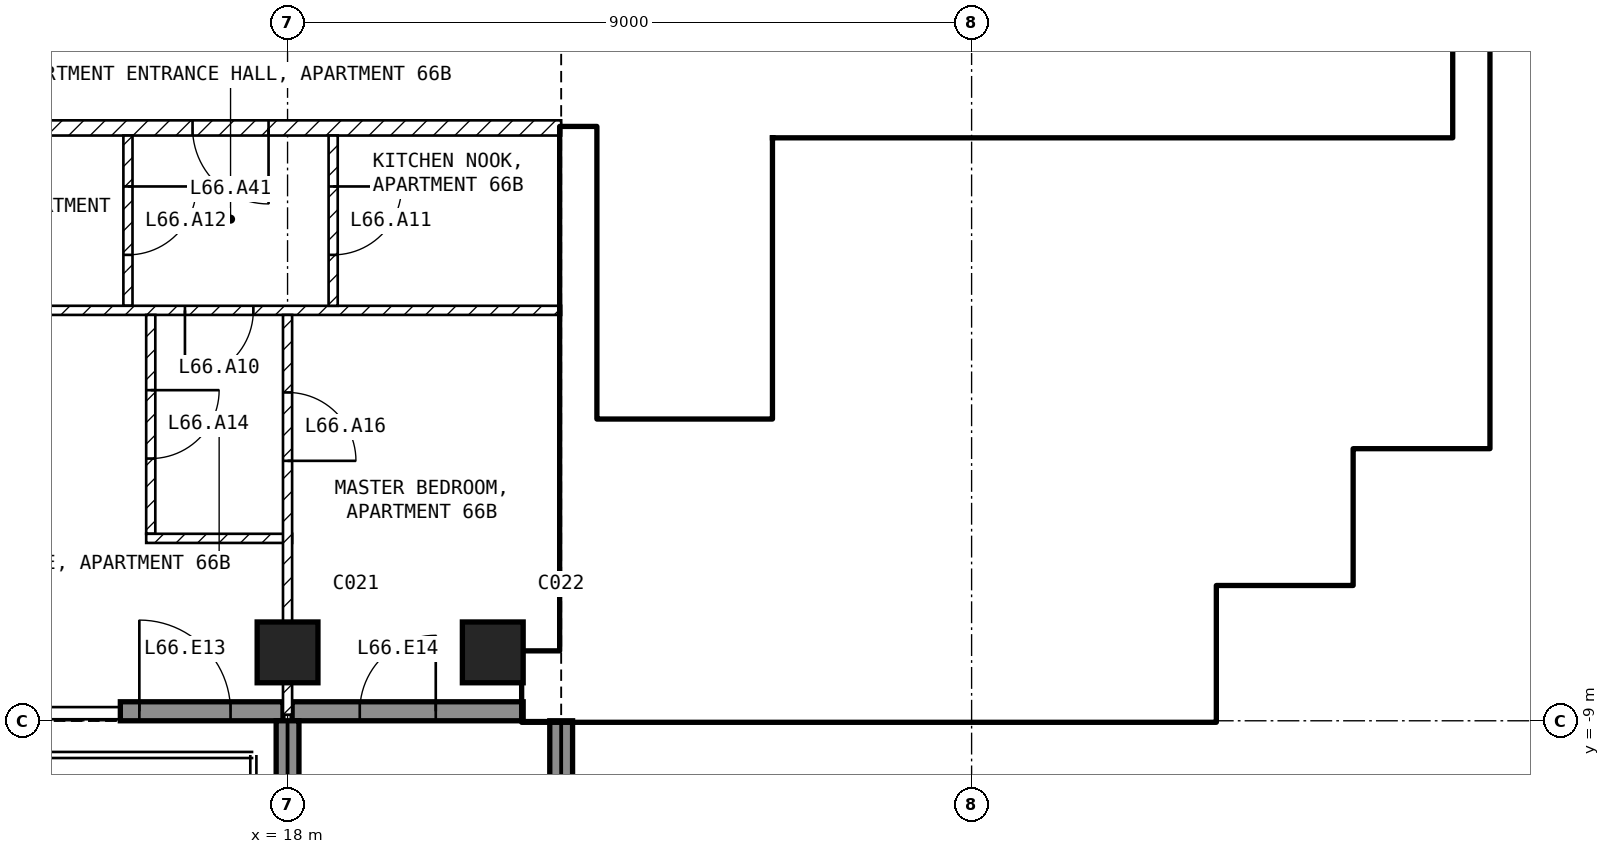
"""IFC4 building model, lengths in metres.
Left out: names, types, materials, properties, quantities, classifications, styles, units other than length and angle.
Written with IfcOpenShell. Run it as: python <this file> out.ifc"""

import sys

from ifc_helpers import new_model, si_unit, direction, frame, frame_2d, origin, origin_2d, place, context, subcontext, project, spatial, rectangle, extrude, element, fill, save


model = new_model("IFC4")
c1 = context("Model", 3, precision=1e-05, world=origin(), true_north=direction((0.0, 1.0)))
c2 = subcontext(c1, "Body", "Model", "MODEL_VIEW")
j1 = project(units=[si_unit("LENGTHUNIT", "METRE"), si_unit("PLANEANGLEUNIT", "RADIAN")], contexts=[c1])
p1 = place(None, origin())
s1 = spatial("IfcSite", under=j1, at=p1, CompositionType="ELEMENT")
p2 = place(p1, origin())
s2 = spatial("IfcBuilding", under=s1, at=p2, CompositionType="ELEMENT")
p3 = place(p2, frame((0.0, 0.0, 260.5)))
s3 = spatial("IfcBuildingStorey", under=s2, at=p3, CompositionType="ELEMENT", Elevation=260.5)
for number, where, z_axis, x_axis in (
    (1, (18.0, -8.1, -0.25), (0.0, 0.0, 1.0), (1.0, 0.0, 0.0)),
    (2, (20.7, -8.1, -0.25), (0.0, 0.0, 1.0), (1.0, 0.0, 0.0)),
):
    element("IfcColumn", number, at=place(p3, frame(where, z_axis=z_axis, x_axis=x_axis)), inside=s3, PredefinedType="COLUMN", context=c2, shape_type="SweptSolid", body=[
        extrude(rectangle(XDim=0.8, YDim=0.8, at=origin_2d()), origin(), (0.0, 0.0, 1.0), 3.5),
    ])
p4 = place(p3, frame((15.8, -8.875, 0.0), z_axis=(0.0, 0.0, 1.0), x_axis=(1.0, 0.0, 0.0)))
e3 = element("IfcWall", 3, at=p4, inside=s3, PredefinedType="SOLIDWALL", context=c2, shape_type="SweptSolid", body=[
    extrude(rectangle(XDim=2.14, YDim=0.25, at=frame_2d((1.07, 0.0))), origin(), (0.0, 0.0, 1.0), 3.25),
])
p5 = place(p4, frame((0.25, 0.0, 0.0)))
e4 = element("IfcOpeningElement", 4, at=p5, cuts=e3, PredefinedType="OPENING", context=c2, shape_type="SweptSolid", body=[
    extrude(rectangle(XDim=1.2, YDim=2.4, at=frame_2d((0.6, 1.2))), frame((0.0, 0.135, 0.0), z_axis=(0.0, -1.0, 0.0), x_axis=(1.0, 0.0, 0.0)), (0.0, 0.0, 1.0), 0.27),
])
p6 = place(p3, frame((18.06, -8.875, 0.0), z_axis=(0.0, 0.0, 1.0), x_axis=(1.0, 0.0, 0.0)))
e5 = element("IfcWall", 5, at=p6, inside=s3, PredefinedType="SOLIDWALL", context=c2, shape_type="SweptSolid", body=[
    extrude(rectangle(XDim=3.04, YDim=0.25, at=frame_2d((1.52, 0.0))), origin(), (0.0, 0.0, 1.0), 3.25),
])
p7 = place(p6, frame((0.89, 0.0, 0.0)))
e6 = element("IfcOpeningElement", 6, at=p7, cuts=e5, PredefinedType="OPENING", context=c2, shape_type="SweptSolid", body=[
    extrude(rectangle(XDim=1.0, YDim=2.4, at=frame_2d((0.5, 1.2))), frame((0.0, 0.135, 0.0), z_axis=(0.0, -1.0, 0.0), x_axis=(1.0, 0.0, 0.0)), (0.0, 0.0, 1.0), 0.27),
])
p8 = place(p3, frame((18.0, -9.0, 0.0), z_axis=(0.0, 0.0, 1.0), x_axis=(0.0, -1.0, 0.0)))
e7 = element("IfcWall", 7, at=p8, inside=s3, PredefinedType="SOLIDWALL", context=c2, shape_type="SweptSolid", body=[
    extrude(rectangle(XDim=2.74, YDim=0.3, at=frame_2d((1.37, 0.0))), origin(), (0.0, 0.0, 1.0), 3.25),
])
p9 = place(p3, frame((21.6, -9.0, 0.0), z_axis=(0.0, 0.0, 1.0), x_axis=(0.0, -1.0, 0.0)))
e8 = element("IfcWall", 8, at=p9, inside=s3, PredefinedType="SOLIDWALL", context=c2, shape_type="SweptSolid", body=[
    extrude(rectangle(XDim=2.7, YDim=0.3, at=frame_2d((1.35, 0.0))), origin(), (0.0, 0.0, 1.0), 3.25),
])
p10 = place(p3, frame((21.1, -8.55, 0.0), z_axis=(0.0, 0.0, 1.0), x_axis=(1.0, 0.0, 0.0)))
e9 = element("IfcWall", 9, at=p10, inside=s3, PredefinedType="SHEAR", context=c2, shape_type="SweptSolid", body=[
    extrude(rectangle(XDim=9.1, YDim=0.9, at=frame_2d((4.55, 0.0))), origin(), (0.0, 0.0, 1.0), 3.25),
])
p11 = place(p3, frame((29.975, -8.1, 0.0), z_axis=(0.0, 0.0, 1.0), x_axis=(0.0, 1.0, 0.0)))
e10 = element("IfcWall", 10, at=p11, inside=s3, PredefinedType="SHEAR", context=c2, shape_type="SweptSolid", body=[
    extrude(rectangle(XDim=1.35, YDim=0.45, at=frame_2d((0.675, 0.0))), origin(), (0.0, 0.0, 1.0), 3.25),
])
for number, where, z_axis, x_axis in (
    (11, (30.2, -6.975, 0.0), (0.0, 0.0, 1.0), (1.0, 0.0, 0.0)),
    (12, (31.775, -6.75, 0.0), (0.0, 0.0, 1.0), (0.0, 1.0, 0.0)),
    (13, (32.0, -5.175, 0.0), (0.0, 0.0, 1.0), (1.0, 0.0, 0.0)),
):
    element("IfcWall", number, at=place(p3, frame(where, z_axis=z_axis, x_axis=x_axis)), inside=s3, PredefinedType="SHEAR", context=c2, shape_type="SweptSolid", body=[
        extrude(rectangle(XDim=1.8, YDim=0.45, at=frame_2d((0.9, 0.0))), origin(), (0.0, 0.0, 1.0), 3.25),
    ])
p12 = place(p3, frame((33.575, -4.95, 0.0), z_axis=(0.0, 0.0, 1.0), x_axis=(0.0, 1.0, 0.0)))
e14 = element("IfcWall", 14, at=p12, inside=s3, PredefinedType="SHEAR", context=c2, shape_type="SweptSolid", body=[
    extrude(rectangle(XDim=10.35, YDim=0.45, at=frame_2d((5.175, 0.0))), origin(), (0.0, 0.0, 1.0), 3.25),
])
p13 = place(p3, frame((21.825, -8.1, 0.0), z_axis=(0.0, 0.0, 1.0), x_axis=(0.0, 1.0, 0.0)))
e15 = element("IfcWall", 15, at=p13, inside=s3, PredefinedType="SHEAR", context=c2, shape_type="SweptSolid", body=[
    extrude(rectangle(XDim=6.9, YDim=0.45, at=frame_2d((3.45, 0.0))), origin(), (0.0, 0.0, 1.0), 3.25),
])
p14 = place(p3, frame((24.5, -5.05, 0.0), z_axis=(0.0, 0.0, 1.0), x_axis=(0.0, 1.0, 0.0)))
e16 = element("IfcWall", 16, at=p14, inside=s3, PredefinedType="SOLIDWALL", context=c2, shape_type="SweptSolid", body=[
    extrude(rectangle(XDim=3.7, YDim=0.2, at=frame_2d((1.85, 0.0))), origin(), (0.0, 0.0, 1.0), 3.25),
])
p15 = place(p14, frame((0.1, 0.0, 0.0)))
e17 = element("IfcOpeningElement", 17, at=p15, cuts=e16, PredefinedType="OPENING", context=c2, shape_type="SweptSolid", body=[
    extrude(rectangle(XDim=0.8, YDim=2.1, at=frame_2d((0.4, 1.05))), frame((0.0, 0.11, 0.0), z_axis=(0.0, -1.0, 0.0), x_axis=(1.0, 0.0, 0.0)), (0.0, 0.0, 1.0), 0.22),
])
p16 = place(p3, frame((22.05, -5.15, 0.0), z_axis=(0.0, 0.0, 1.0), x_axis=(1.0, 0.0, 0.0)))
e18 = element("IfcWall", 18, at=p16, inside=s3, PredefinedType="SOLIDWALL", context=c2, shape_type="SweptSolid", body=[
    extrude(rectangle(XDim=6.3, YDim=0.2, at=frame_2d((3.15, 0.0))), origin(), (0.0, 0.0, 1.0), 3.25),
])
p17 = place(p16, frame((0.2, 0.0, 0.0)))
e19 = element("IfcOpeningElement", 19, at=p17, cuts=e18, PredefinedType="OPENING", context=c2, shape_type="SweptSolid", body=[
    extrude(rectangle(XDim=1.0, YDim=2.1, at=frame_2d((0.5, 1.05))), frame((0.0, 0.11, 0.0), z_axis=(0.0, -1.0, 0.0), x_axis=(1.0, 0.0, 0.0)), (0.0, 0.0, 1.0), 0.22),
])
p18 = place(p3, frame((28.25, -8.1, 0.0), z_axis=(0.0, 0.0, 1.0), x_axis=(0.0, 1.0, 0.0)))
e20 = element("IfcWall", 20, at=p18, inside=s3, PredefinedType="SOLIDWALL", context=c2, shape_type="SweptSolid", body=[
    extrude(rectangle(XDim=2.85, YDim=0.2, at=frame_2d((1.425, 0.0))), origin(), (0.0, 0.0, 1.0), 3.25),
])
p19 = place(p3, frame((24.6, -1.45, 0.0), z_axis=(0.0, 0.0, 1.0), x_axis=(1.0, 0.0, 0.0)))
e21 = element("IfcWall", 21, at=p19, inside=s3, PredefinedType="SOLIDWALL", context=c2, shape_type="SweptSolid", body=[
    extrude(rectangle(XDim=8.75, YDim=0.2, at=frame_2d((4.375, 0.0))), origin(), (0.0, 0.0, 1.0), 3.25),
])
p20 = place(p19, frame((0.4, 0.0, 0.0)))
e22 = element("IfcOpeningElement", 22, at=p20, cuts=e21, PredefinedType="OPENING", context=c2, shape_type="SweptSolid", body=[
    extrude(rectangle(XDim=1.0, YDim=2.1, at=frame_2d((0.5, 1.05))), frame((0.0, 0.11, 0.0), z_axis=(0.0, -1.0, 0.0), x_axis=(1.0, 0.0, 0.0)), (0.0, 0.0, 1.0), 0.22),
])
p21 = place(p19, frame((2.4, 0.0, 0.0)))
e23 = element("IfcOpeningElement", 23, at=p21, cuts=e21, PredefinedType="OPENING", context=c2, shape_type="SweptSolid", body=[
    extrude(rectangle(XDim=1.0, YDim=2.1, at=frame_2d((0.5, 1.05))), frame((0.0, 0.11, 0.0), z_axis=(0.0, -1.0, 0.0), x_axis=(1.0, 0.0, 0.0)), (0.0, 0.0, 1.0), 0.22),
])
p22 = place(p19, frame((4.4, 0.0, 0.0)))
e24 = element("IfcOpeningElement", 24, at=p22, cuts=e21, PredefinedType="OPENING", context=c2, shape_type="SweptSolid", body=[
    extrude(rectangle(XDim=1.0, YDim=2.1, at=frame_2d((0.5, 1.05))), frame((0.0, 0.11, 0.0), z_axis=(0.0, -1.0, 0.0), x_axis=(1.0, 0.0, 0.0)), (0.0, 0.0, 1.0), 0.22),
])
p23 = place(p19, frame((6.925, 0.0, 0.0)))
e25 = element("IfcOpeningElement", 25, at=p23, cuts=e21, PredefinedType="OPENING", context=c2, shape_type="SweptSolid", body=[
    extrude(rectangle(XDim=0.9, YDim=2.1, at=frame_2d((0.45, 1.05))), frame((0.0, 0.11, 0.0), z_axis=(0.0, -1.0, 0.0), x_axis=(1.0, 0.0, 0.0)), (0.0, 0.0, 1.0), 0.22),
])
p24 = place(p3, frame((24.6, -3.95, 0.0), z_axis=(0.0, 0.0, 1.0), x_axis=(1.0, 0.0, 0.0)))
e26 = element("IfcWall", 26, at=p24, inside=s3, PredefinedType="SOLIDWALL", context=c2, shape_type="SweptSolid", body=[
    extrude(rectangle(XDim=8.75, YDim=0.2, at=frame_2d((4.375, 0.0))), origin(), (0.0, 0.0, 1.0), 3.25),
])
for number, where, z_axis, x_axis in (
    (27, (26.5, -3.85, 0.0), (0.0, 0.0, 1.0), (0.0, 1.0, 0.0)),
    (28, (28.5, -3.85, 0.0), (0.0, 0.0, 1.0), (0.0, 1.0, 0.0)),
    (29, (30.5, -3.85, 0.0), (0.0, 0.0, 1.0), (0.0, 1.0, 0.0)),
):
    element("IfcWall", number, at=place(p3, frame(where, z_axis=z_axis, x_axis=x_axis)), inside=s3, PredefinedType="SOLIDWALL", context=c2, shape_type="SweptSolid", body=[
        extrude(rectangle(XDim=2.3, YDim=0.2, at=frame_2d((1.15, 0.0))), origin(), (0.0, 0.0, 1.0), 3.25),
    ])
p25 = place(p3, frame((27.4, -5.05, 0.0), z_axis=(0.0, 0.0, 1.0), x_axis=(0.0, 1.0, 0.0)))
e30 = element("IfcWall", 30, at=p25, inside=s3, PredefinedType="PARTITIONING", context=c2, shape_type="SweptSolid", body=[
    extrude(rectangle(XDim=1.0, YDim=0.15, at=frame_2d((0.5, 0.0))), origin(), (0.0, 0.0, 1.0), 3.25),
])
p26 = place(p25, frame((0.1, 0.0, 0.0)))
e31 = element("IfcOpeningElement", 31, at=p26, cuts=e30, PredefinedType="OPENING", context=c2, shape_type="SweptSolid", body=[
    extrude(rectangle(XDim=0.8, YDim=2.1, at=frame_2d((0.4, 1.05))), frame((0.0, 0.085, 0.0), z_axis=(0.0, -1.0, 0.0), x_axis=(1.0, 0.0, 0.0)), (0.0, 0.0, 1.0), 0.17),
])
p27 = place(p3, frame((21.6, -1.2, 0.0), z_axis=(0.0, 0.0, 1.0), x_axis=(-1.0, 0.0, 0.0)))
e32 = element("IfcWall", 32, at=p27, inside=s3, PredefinedType="PARTITIONING", context=c2, shape_type="SweptSolid", body=[
    extrude(rectangle(XDim=17.2, YDim=0.2, at=frame_2d((8.6, 0.0))), origin(), (0.0, 0.0, 1.0), 3.25),
])
p28 = place(p27, frame((3.85, 0.0, 0.0)))
e33 = element("IfcOpeningElement", 33, at=p28, cuts=e32, PredefinedType="OPENING", context=c2, shape_type="SweptSolid", body=[
    extrude(rectangle(XDim=1.0, YDim=2.1, at=frame_2d((0.5, 1.05))), frame((0.0, 0.11, 0.0), z_axis=(0.0, -1.0, 0.0), x_axis=(1.0, 0.0, 0.0)), (0.0, 0.0, 1.0), 0.22),
])
p29 = place(p3, frame((15.9, -1.3, 0.0), z_axis=(0.0, 0.0, 1.0), x_axis=(0.0, -1.0, 0.0)))
e34 = element("IfcWall", 34, at=p29, inside=s3, PredefinedType="PARTITIONING", context=c2, shape_type="SweptSolid", body=[
    extrude(rectangle(XDim=2.24, YDim=0.12, at=frame_2d((1.12, 0.0))), origin(), (0.0, 0.0, 1.0), 3.25),
])
p30 = place(p29, frame((0.67, 0.0, 0.0)))
e35 = element("IfcOpeningElement", 35, at=p30, cuts=e34, PredefinedType="OPENING", context=c2, shape_type="SweptSolid", body=[
    extrude(rectangle(XDim=0.9, YDim=2.1, at=frame_2d((0.45, 1.05))), frame((0.0, 0.07, 0.0), z_axis=(0.0, -1.0, 0.0), x_axis=(1.0, 0.0, 0.0)), (0.0, 0.0, 1.0), 0.14),
])
p31 = place(p3, frame((21.6, -3.6, 0.0), z_axis=(0.0, 0.0, 1.0), x_axis=(-1.0, 0.0, 0.0)))
e36 = element("IfcWall", 36, at=p31, inside=s3, PredefinedType="PARTITIONING", context=c2, shape_type="SweptSolid", body=[
    extrude(rectangle(XDim=9.0, YDim=0.12, at=frame_2d((4.5, 0.0))), origin(), (0.0, 0.0, 1.0), 3.25),
])
p32 = place(p31, frame((4.05, 0.0, 0.0)))
e37 = element("IfcOpeningElement", 37, at=p32, cuts=e36, PredefinedType="OPENING", context=c2, shape_type="SweptSolid", body=[
    extrude(rectangle(XDim=0.9, YDim=2.1, at=frame_2d((0.45, 1.05))), frame((0.0, 0.07, 0.0), z_axis=(0.0, -1.0, 0.0), x_axis=(1.0, 0.0, 0.0)), (0.0, 0.0, 1.0), 0.14),
])
p33 = place(p3, frame((18.6, -1.3, 0.0), z_axis=(0.0, 0.0, 1.0), x_axis=(0.0, -1.0, 0.0)))
e38 = element("IfcWall", 38, at=p33, inside=s3, PredefinedType="PARTITIONING", context=c2, shape_type="SweptSolid", body=[
    extrude(rectangle(XDim=2.24, YDim=0.12, at=frame_2d((1.12, 0.0))), origin(), (0.0, 0.0, 1.0), 3.25),
])
p34 = place(p33, frame((0.67, 0.0, 0.0)))
e39 = element("IfcOpeningElement", 39, at=p34, cuts=e38, PredefinedType="OPENING", context=c2, shape_type="SweptSolid", body=[
    extrude(rectangle(XDim=0.9, YDim=2.1, at=frame_2d((0.45, 1.05))), frame((0.0, 0.07, 0.0), z_axis=(0.0, -1.0, 0.0), x_axis=(1.0, 0.0, 0.0)), (0.0, 0.0, 1.0), 0.14),
])
p35 = place(p3, frame((16.2, -3.66, 0.0), z_axis=(0.0, 0.0, 1.0), x_axis=(0.0, -1.0, 0.0)))
e40 = element("IfcWall", 40, at=p35, inside=s3, PredefinedType="PARTITIONING", context=c2, shape_type="SweptSolid", body=[
    extrude(rectangle(XDim=2.88, YDim=0.12, at=frame_2d((1.44, 0.0))), origin(), (0.0, 0.0, 1.0), 3.25),
])
p36 = place(p35, frame((0.99, 0.0, 0.0)))
e41 = element("IfcOpeningElement", 41, at=p36, cuts=e40, PredefinedType="OPENING", context=c2, shape_type="SweptSolid", body=[
    extrude(rectangle(XDim=0.9, YDim=2.1, at=frame_2d((0.45, 1.05))), frame((0.0, 0.07, 0.0), z_axis=(0.0, -1.0, 0.0), x_axis=(1.0, 0.0, 0.0)), (0.0, 0.0, 1.0), 0.14),
])
p37 = place(p3, frame((16.14, -6.6, 0.0), z_axis=(0.0, 0.0, 1.0), x_axis=(1.0, 0.0, 0.0)))
e42 = element("IfcWall", 42, at=p37, inside=s3, PredefinedType="PARTITIONING", context=c2, shape_type="SweptSolid", body=[
    extrude(rectangle(XDim=1.92, YDim=0.12, at=frame_2d((0.96, 0.0))), origin(), (0.0, 0.0, 1.0), 3.25),
])
p38 = place(p3, frame((18.0, -3.66, 0.0), z_axis=(0.0, 0.0, 1.0), x_axis=(0.0, -1.0, 0.0)))
e43 = element("IfcWall", 43, at=p38, inside=s3, PredefinedType="PARTITIONING", context=c2, shape_type="SweptSolid", body=[
    extrude(rectangle(XDim=5.26, YDim=0.12, at=frame_2d((2.63, 0.0))), origin(), (0.0, 0.0, 1.0), 2.496),
])
p39 = place(p38, frame((1.02, 0.0, 0.0)))
e44 = element("IfcOpeningElement", 44, at=p39, cuts=e43, PredefinedType="OPENING", context=c2, shape_type="SweptSolid", body=[
    extrude(rectangle(XDim=0.9, YDim=2.1, at=frame_2d((0.45, 1.05))), frame((0.0, 0.07, 0.0), z_axis=(0.0, -1.0, 0.0), x_axis=(1.0, 0.0, 0.0)), (0.0, 0.0, 1.0), 0.14),
])
p40 = place(p5, origin())
e45 = element("IfcDoor", 45, at=p40, inside=s3, OperationType="SINGLE_SWING_LEFT", PredefinedType="DOOR", context=c2, shape_type="SweptSolid", body=[
    extrude(rectangle(XDim=1.2, YDim=2.4, at=frame_2d((0.6, 1.2))), frame((0.0, 0.025, 0.0), z_axis=(0.0, -1.0, 0.0), x_axis=(1.0, 0.0, 0.0)), (0.0, 0.0, 1.0), 0.05),
])
fill(e4, e45)
p41 = place(p7, origin())
e46 = element("IfcDoor", 46, at=p41, inside=s3, OperationType="SINGLE_SWING_RIGHT", PredefinedType="DOOR", context=c2, shape_type="SweptSolid", body=[
    extrude(rectangle(XDim=1.0, YDim=2.4, at=frame_2d((0.5, 1.2))), frame((0.0, 0.025, 0.0), z_axis=(0.0, -1.0, 0.0), x_axis=(1.0, 0.0, 0.0)), (0.0, 0.0, 1.0), 0.05),
])
fill(e6, e46)
p42 = place(p20, origin())
e47 = element("IfcDoor", 47, at=p42, inside=s3, OperationType="DOUBLE_DOOR_SLIDING", PredefinedType="DOOR", context=c2, shape_type="SweptSolid", body=[
    extrude(rectangle(XDim=1.0, YDim=2.1, at=frame_2d((0.5, 1.05))), frame((0.0, 0.025, 0.0), z_axis=(0.0, -1.0, 0.0), x_axis=(1.0, 0.0, 0.0)), (0.0, 0.0, 1.0), 0.05),
])
fill(e22, e47)
p43 = place(p21, origin())
e48 = element("IfcDoor", 48, at=p43, inside=s3, OperationType="DOUBLE_DOOR_SLIDING", PredefinedType="DOOR", context=c2, shape_type="SweptSolid", body=[
    extrude(rectangle(XDim=1.0, YDim=2.1, at=frame_2d((0.5, 1.05))), frame((0.0, 0.025, 0.0), z_axis=(0.0, -1.0, 0.0), x_axis=(1.0, 0.0, 0.0)), (0.0, 0.0, 1.0), 0.05),
])
fill(e23, e48)
p44 = place(p22, origin())
e49 = element("IfcDoor", 49, at=p44, inside=s3, OperationType="DOUBLE_DOOR_SLIDING", PredefinedType="DOOR", context=c2, shape_type="SweptSolid", body=[
    extrude(rectangle(XDim=1.0, YDim=2.1, at=frame_2d((0.5, 1.05))), frame((0.0, 0.025, 0.0), z_axis=(0.0, -1.0, 0.0), x_axis=(1.0, 0.0, 0.0)), (0.0, 0.0, 1.0), 0.05),
])
fill(e24, e49)
p45 = place(p17, origin())
e50 = element("IfcDoor", 50, at=p45, inside=s3, OperationType="SINGLE_SWING_LEFT", PredefinedType="DOOR", context=c2, shape_type="SweptSolid", body=[
    extrude(rectangle(XDim=1.0, YDim=2.1, at=frame_2d((0.5, 1.05))), frame((0.0, 0.025, 0.0), z_axis=(0.0, -1.0, 0.0), x_axis=(1.0, 0.0, 0.0)), (0.0, 0.0, 1.0), 0.05),
])
fill(e19, e50)
p46 = place(p15, origin())
e51 = element("IfcDoor", 51, at=p46, inside=s3, OperationType="SINGLE_SWING_LEFT", PredefinedType="DOOR", context=c2, shape_type="SweptSolid", body=[
    extrude(rectangle(XDim=0.8, YDim=2.1, at=frame_2d((0.4, 1.05))), frame((0.0, 0.025, 0.0), z_axis=(0.0, -1.0, 0.0), x_axis=(1.0, 0.0, 0.0)), (0.0, 0.0, 1.0), 0.05),
])
fill(e17, e51)
p47 = place(p26, origin())
e52 = element("IfcDoor", 52, at=p47, inside=s3, OperationType="SINGLE_SWING_LEFT", PredefinedType="DOOR", context=c2, shape_type="SweptSolid", body=[
    extrude(rectangle(XDim=0.8, YDim=2.1, at=frame_2d((0.4, 1.05))), frame((0.0, 0.025, 0.0), z_axis=(0.0, -1.0, 0.0), x_axis=(1.0, 0.0, 0.0)), (0.0, 0.0, 1.0), 0.05),
])
fill(e31, e52)
p48 = place(p23, origin())
e53 = element("IfcDoor", 53, at=p48, inside=s3, OperationType="SINGLE_SWING_LEFT", PredefinedType="DOOR", context=c2, shape_type="SweptSolid", body=[
    extrude(rectangle(XDim=0.9, YDim=2.1, at=frame_2d((0.45, 1.05))), frame((0.0, 0.025, 0.0), z_axis=(0.0, -1.0, 0.0), x_axis=(1.0, 0.0, 0.0)), (0.0, 0.0, 1.0), 0.05),
])
fill(e25, e53)
p49 = place(p32, origin())
e54 = element("IfcDoor", 54, at=p49, inside=s3, OperationType="SINGLE_SWING_RIGHT", PredefinedType="DOOR", context=c2, shape_type="SweptSolid", body=[
    extrude(rectangle(XDim=0.9, YDim=2.1, at=frame_2d((0.45, 1.05))), frame((0.0, 0.025, 0.0), z_axis=(0.0, -1.0, 0.0), x_axis=(1.0, 0.0, 0.0)), (0.0, 0.0, 1.0), 0.05),
])
fill(e37, e54)
p50 = place(p34, origin())
e55 = element("IfcDoor", 55, at=p50, inside=s3, OperationType="SINGLE_SWING_LEFT", PredefinedType="DOOR", context=c2, shape_type="SweptSolid", body=[
    extrude(rectangle(XDim=0.9, YDim=2.1, at=frame_2d((0.45, 1.05))), frame((0.0, 0.025, 0.0), z_axis=(0.0, -1.0, 0.0), x_axis=(1.0, 0.0, 0.0)), (0.0, 0.0, 1.0), 0.05),
])
fill(e39, e55)
p51 = place(p30, origin())
e56 = element("IfcDoor", 56, at=p51, inside=s3, OperationType="SINGLE_SWING_LEFT", PredefinedType="DOOR", context=c2, shape_type="SweptSolid", body=[
    extrude(rectangle(XDim=0.9, YDim=2.1, at=frame_2d((0.45, 1.05))), frame((0.0, 0.025, 0.0), z_axis=(0.0, -1.0, 0.0), x_axis=(1.0, 0.0, 0.0)), (0.0, 0.0, 1.0), 0.05),
])
fill(e35, e56)
p52 = place(p36, origin())
e57 = element("IfcDoor", 57, at=p52, inside=s3, OperationType="SINGLE_SWING_LEFT", PredefinedType="DOOR", context=c2, shape_type="SweptSolid", body=[
    extrude(rectangle(XDim=0.9, YDim=2.1, at=frame_2d((0.45, 1.05))), frame((0.0, 0.025, 0.0), z_axis=(0.0, -1.0, 0.0), x_axis=(1.0, 0.0, 0.0)), (0.0, 0.0, 1.0), 0.05),
])
fill(e41, e57)
p53 = place(p39, origin())
e58 = element("IfcDoor", 58, at=p53, inside=s3, OperationType="SINGLE_SWING_RIGHT", PredefinedType="DOOR", context=c2, shape_type="SweptSolid", body=[
    extrude(rectangle(XDim=0.9, YDim=2.1, at=frame_2d((0.45, 1.05))), frame((0.0, 0.025, 0.0), z_axis=(0.0, -1.0, 0.0), x_axis=(1.0, 0.0, 0.0)), (0.0, 0.0, 1.0), 0.05),
])
fill(e44, e58)
p54 = place(p28, origin())
e59 = element("IfcDoor", 59, at=p54, inside=s3, OperationType="SINGLE_SWING_LEFT", PredefinedType="DOOR", context=c2, shape_type="SweptSolid", body=[
    extrude(rectangle(XDim=1.0, YDim=2.1, at=frame_2d((0.5, 1.05))), frame((0.0, 0.025, 0.0), z_axis=(0.0, -1.0, 0.0), x_axis=(1.0, 0.0, 0.0)), (0.0, 0.0, 1.0), 0.05),
])
fill(e33, e59)
save(model, sys.argv[1])
